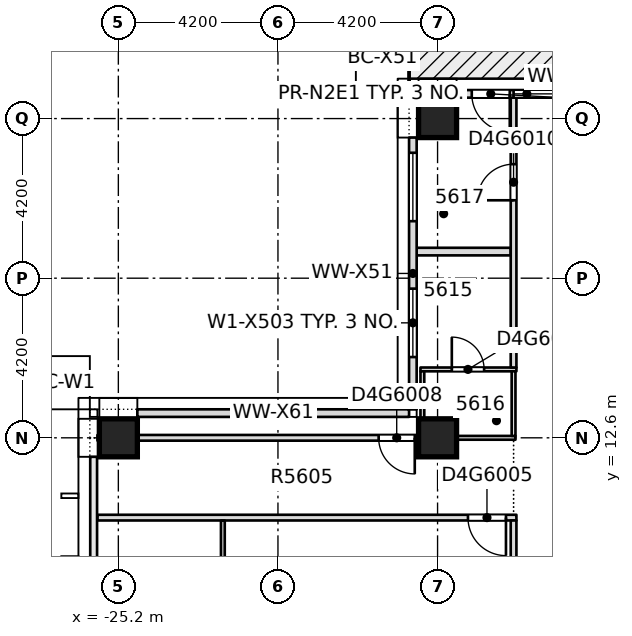
"""IFC4 building model, lengths in metres.
Left out: names, types, materials, properties, quantities, classifications, styles, units other than length and angle.
Written with IfcOpenShell. Run it as: python <this file> out.ifc"""

import sys

from ifc_helpers import new_model, si_unit, direction, frame, frame_2d, origin, origin_2d, place, context, subcontext, project, spatial, rectangle, extrude, element, fill, save


model = new_model("IFC4")
c1 = context("Model", 3, precision=1e-05, world=origin(), true_north=direction((0.0, 1.0)))
c2 = subcontext(c1, "Body", "Model", "MODEL_VIEW")
j1 = project(units=[si_unit("LENGTHUNIT", "METRE"), si_unit("PLANEANGLEUNIT", "RADIAN")], contexts=[c1])
p1 = place(None, origin())
s1 = spatial("IfcSite", under=j1, at=p1, CompositionType="ELEMENT")
p2 = place(p1, origin())
s2 = spatial("IfcBuilding", under=s1, at=p2, CompositionType="ELEMENT")
p3 = place(p2, frame((0.0, 0.0, 213.5)))
s3 = spatial("IfcBuildingStorey", under=s2, at=p3, CompositionType="ELEMENT", Elevation=213.5)
p4 = place(p3, frame((-25.2, 12.6, -0.4), z_axis=(0.0, 0.0, 1.0), x_axis=(1.0, 0.0, 0.0)))
e1 = element("IfcColumn", 1, at=p4, inside=s3, PredefinedType="COLUMN", context=c2, shape_type="SweptSolid", body=[
    extrude(rectangle(XDim=1.0, YDim=1.0, at=origin_2d()), origin(), (0.0, 0.0, 1.0), 3.4),
])
p5 = place(p3, frame((-16.8, 12.6, -0.4), z_axis=(0.0, 0.0, 1.0), x_axis=(1.0, 0.0, 0.0)))
e2 = element("IfcColumn", 2, at=p5, inside=s3, PredefinedType="COLUMN", context=c2, shape_type="SweptSolid", body=[
    extrude(rectangle(XDim=1.0, YDim=1.0, at=origin_2d()), origin(), (0.0, 0.0, 1.0), 3.85),
])
p6 = place(p3, frame((-16.8, 21.0, -0.4), z_axis=(0.0, 0.0, 1.0), x_axis=(1.0, 0.0, 0.0)))
e3 = element("IfcColumn", 3, at=p6, inside=s3, PredefinedType="COLUMN", context=c2, shape_type="SweptSolid", body=[
    extrude(rectangle(XDim=1.0, YDim=1.0, at=origin_2d()), origin(), (0.0, 0.0, 1.0), 3.4),
])
p7 = place(p3, frame((-25.75, 10.5, 0.0), z_axis=(0.0, 0.0, 1.0), x_axis=(1.0, 0.0, 0.0)))
e4 = element("IfcWall", 4, at=p7, inside=s3, PredefinedType="PARTITIONING", context=c2, shape_type="SweptSolid", body=[
    extrude(rectangle(XDim=11.025, YDim=0.15, at=frame_2d((5.512, 0.0))), origin(), (0.0, 0.0, 1.0), 3.0),
])
p8 = place(p7, frame((9.75, 0.0, 0.0)))
e5 = element("IfcOpeningElement", 5, at=p8, cuts=e4, PredefinedType="OPENING", context=c2, shape_type="SweptSolid", body=[
    extrude(rectangle(XDim=1.0, YDim=2.1, at=frame_2d((0.5, 1.05))), frame((0.0, 0.085, 0.0), z_axis=(0.0, -1.0, 0.0), x_axis=(1.0, 0.0, 0.0)), (0.0, 0.0, 1.0), 0.17),
])
p9 = place(p3, frame((-25.75, 12.6, 0.0), z_axis=(0.0, 0.0, 1.0), x_axis=(1.0, 0.0, 0.0)))
e6 = element("IfcWall", 6, at=p9, inside=s3, PredefinedType="PARTITIONING", context=c2, shape_type="SweptSolid", body=[
    extrude(rectangle(XDim=1.05, YDim=0.15, at=frame_2d((0.525, 0.0))), origin(), (0.0, 0.0, 1.0), 3.0),
])
p10 = place(p3, frame((-17.25, 12.6, 0.0), z_axis=(0.0, 0.0, 1.0), x_axis=(1.0, 0.0, 0.0)))
e7 = element("IfcWall", 7, at=p10, inside=s3, PredefinedType="PARTITIONING", context=c2, shape_type="SweptSolid", body=[
    extrude(rectangle(XDim=2.5, YDim=0.1, at=frame_2d((1.25, 0.0))), origin(), (0.0, 0.0, 1.0), 3.0),
])
p11 = place(p3, frame((-17.25, 14.4, 0.0), z_axis=(0.0, 0.0, 1.0), x_axis=(1.0, 0.0, 0.0)))
e8 = element("IfcWall", 8, at=p11, inside=s3, PredefinedType="PARTITIONING", context=c2, shape_type="SweptSolid", body=[
    extrude(rectangle(XDim=2.525, YDim=0.1, at=frame_2d((1.262, 0.0))), origin(), (0.0, 0.0, 1.0), 3.0),
])
p12 = place(p11, frame((0.825, 0.0, 0.0)))
e9 = element("IfcOpeningElement", 9, at=p12, cuts=e8, PredefinedType="OPENING", context=c2, shape_type="SweptSolid", body=[
    extrude(rectangle(XDim=0.85, YDim=2.1, at=frame_2d((0.425, 1.05))), frame((0.0, 0.06, 0.0), z_axis=(0.0, -1.0, 0.0), x_axis=(1.0, 0.0, 0.0)), (0.0, 0.0, 1.0), 0.12),
])
p13 = place(p3, frame((-17.35, 17.5, 0.0), z_axis=(0.0, 0.0, 1.0), x_axis=(1.0, 0.0, 0.0)))
e10 = element("IfcWall", 10, at=p13, inside=s3, PredefinedType="PARTITIONING", context=c2, shape_type="SweptSolid", body=[
    extrude(rectangle(XDim=2.475, YDim=0.2, at=frame_2d((1.238, 0.0))), origin(), (0.0, 0.0, 1.0), 3.0),
])
p14 = place(p3, frame((-22.45, 5.45, 0.0), z_axis=(0.0, 0.0, 1.0), x_axis=(0.0, 1.0, 0.0)))
e11 = element("IfcWall", 11, at=p14, inside=s3, PredefinedType="PARTITIONING", context=c2, shape_type="SweptSolid", body=[
    extrude(rectangle(XDim=4.975, YDim=0.1, at=frame_2d((2.488, 0.0))), origin(), (0.0, 0.0, 1.0), 3.0),
])
p15 = place(p3, frame((-17.2, 12.675, 0.0), z_axis=(0.0, 0.0, 1.0), x_axis=(0.0, 1.0, 0.0)))
e12 = element("IfcWall", 12, at=p15, inside=s3, PredefinedType="PARTITIONING", context=c2, shape_type="SweptSolid", body=[
    extrude(rectangle(XDim=1.675, YDim=0.1, at=frame_2d((0.837, 0.0))), origin(), (0.0, 0.0, 1.0), 3.0),
])
p16 = place(p3, frame((-14.8, -3.35, 0.0), z_axis=(0.0, 0.0, 1.0), x_axis=(0.0, 1.0, 0.0)))
e13 = element("IfcWall", 13, at=p16, inside=s3, PredefinedType="PARTITIONING", context=c2, shape_type="SweptSolid", body=[
    extrude(rectangle(XDim=13.775, YDim=0.15, at=frame_2d((6.888, 0.0))), origin(), (0.0, 0.0, 1.0), 3.0),
])
p17 = place(p16, frame((2.8, 0.0, 0.0)))
e14 = element("IfcOpeningElement", 14, at=p17, cuts=e13, PredefinedType="OPENING", context=c2, shape_type="SweptSolid", body=[
    extrude(rectangle(XDim=1.1, YDim=2.1, at=frame_2d((0.55, 1.05))), frame((0.0, 0.085, 0.0), z_axis=(0.0, -1.0, 0.0), x_axis=(1.0, 0.0, 0.0)), (0.0, 0.0, 1.0), 0.17),
])
p18 = place(p3, frame((-14.8, 12.65, 0.0), z_axis=(0.0, 0.0, 1.0), x_axis=(0.0, 1.0, 0.0)))
e15 = element("IfcWall", 15, at=p18, inside=s3, PredefinedType="PARTITIONING", context=c2, shape_type="SweptSolid", body=[
    extrude(rectangle(XDim=1.7, YDim=0.1, at=frame_2d((0.85, 0.0))), origin(), (0.0, 0.0, 1.0), 3.0),
])
p19 = place(p3, frame((-14.8, 14.45, 0.0), z_axis=(0.0, 0.0, 1.0), x_axis=(0.0, 1.0, 0.0)))
e16 = element("IfcWall", 16, at=p19, inside=s3, PredefinedType="PARTITIONING", context=c2, shape_type="SweptSolid", body=[
    extrude(rectangle(XDim=7.1, YDim=0.15, at=frame_2d((3.55, 0.0))), origin(), (0.0, 0.0, 1.0), 3.0),
])
p20 = place(p19, frame((4.4, 0.0, 0.0)))
e17 = element("IfcOpeningElement", 17, at=p20, cuts=e16, PredefinedType="OPENING", context=c2, shape_type="SweptSolid", body=[
    extrude(rectangle(XDim=0.95, YDim=2.1, at=frame_2d((0.475, 1.05))), frame((0.0, 0.085, 0.0), z_axis=(0.0, -1.0, 0.0), x_axis=(1.0, 0.0, 0.0)), (0.0, 0.0, 1.0), 0.17),
])
p21 = place(p3, frame((-12.6, 21.65, 0.0), z_axis=(0.0, 0.0, 1.0), x_axis=(-1.0, 0.0, 0.0)))
e18 = element("IfcWall", 18, at=p21, inside=s3, PredefinedType="STANDARD", context=c2, shape_type="SweptSolid", body=[
    extrude(rectangle(XDim=3.7, YDim=0.2, at=frame_2d((1.85, 0.0))), origin(), (0.0, 0.0, 1.0), 3.0),
])
p22 = place(p21, frame((0.4, 0.0, 0.2)))
e19 = element("IfcOpeningElement", 19, at=p22, cuts=e18, PredefinedType="OPENING", context=c2, shape_type="SweptSolid", body=[
    extrude(rectangle(XDim=1.8, YDim=2.65, at=frame_2d((0.9, 1.325))), frame((0.0, 0.11, 0.0), z_axis=(0.0, -1.0, 0.0), x_axis=(1.0, 0.0, 0.0)), (0.0, 0.0, 1.0), 0.22),
])
p23 = place(p21, frame((2.3, 0.0, 0.0)))
e20 = element("IfcOpeningElement", 20, at=p23, cuts=e18, PredefinedType="OPENING", context=c2, shape_type="SweptSolid", body=[
    extrude(rectangle(XDim=1.0, YDim=2.4, at=frame_2d((0.5, 1.2))), frame((0.0, 0.11, 0.0), z_axis=(0.0, -1.0, 0.0), x_axis=(1.0, 0.0, 0.0)), (0.0, 0.0, 1.0), 0.22),
])
p24 = place(p3, frame((-17.45, 20.5, 0.0), z_axis=(0.0, 0.0, 1.0), x_axis=(0.0, -1.0, 0.0)))
e21 = element("IfcWall", 21, at=p24, inside=s3, PredefinedType="STANDARD", context=c2, shape_type="SweptSolid", body=[
    extrude(rectangle(XDim=7.15, YDim=0.2, at=frame_2d((3.575, 0.0))), origin(), (0.0, 0.0, 1.0), 3.0),
])
p25 = place(p24, frame((3.975, 0.0, 0.2)))
e22 = element("IfcOpeningElement", 22, at=p25, cuts=e21, PredefinedType="OPENING", context=c2, shape_type="SweptSolid", body=[
    extrude(rectangle(XDim=1.8, YDim=2.65, at=frame_2d((0.9, 1.325))), frame((0.0, 0.11, 0.0), z_axis=(0.0, -1.0, 0.0), x_axis=(1.0, 0.0, 0.0)), (0.0, 0.0, 1.0), 0.22),
])
p26 = place(p24, frame((0.4, 0.0, 0.2)))
e23 = element("IfcOpeningElement", 23, at=p26, cuts=e21, PredefinedType="OPENING", context=c2, shape_type="SweptSolid", body=[
    extrude(rectangle(XDim=1.8, YDim=2.65, at=frame_2d((0.9, 1.325))), frame((0.0, 0.11, 0.0), z_axis=(0.0, -1.0, 0.0), x_axis=(1.0, 0.0, 0.0)), (0.0, 0.0, 1.0), 0.22),
])
p27 = place(p3, frame((-17.55, 13.25, 0.0), z_axis=(0.0, 0.0, 1.0), x_axis=(-1.0, 0.0, 0.0)))
e24 = element("IfcWall", 24, at=p27, inside=s3, PredefinedType="STANDARD", context=c2, shape_type="SweptSolid", body=[
    extrude(rectangle(XDim=7.15, YDim=0.2, at=frame_2d((3.575, 0.0))), origin(), (0.0, 0.0, 1.0), 3.0),
])
p28 = place(p3, frame((-24.7, 12.6, 0.0), z_axis=(0.0, 0.0, 1.0), x_axis=(1.0, 0.0, 0.0)))
e25 = element("IfcWall", 25, at=p28, inside=s3, PredefinedType="PARTITIONING", context=c2, shape_type="SweptSolid", body=[
    extrude(rectangle(XDim=7.4, YDim=0.15, at=frame_2d((3.7, 0.0))), origin(), (0.0, 0.0, 1.0), 2.45),
])
p29 = place(p28, frame((6.35, 0.0, 0.0)))
e26 = element("IfcOpeningElement", 26, at=p29, cuts=e25, PredefinedType="OPENING", context=c2, shape_type="SweptSolid", body=[
    extrude(rectangle(XDim=0.95, YDim=2.1, at=frame_2d((0.475, 1.05))), frame((0.0, 0.085, 0.0), z_axis=(0.0, -1.0, 0.0), x_axis=(1.0, 0.0, 0.0)), (0.0, 0.0, 1.0), 0.17),
])
p30 = place(p3, frame((-17.3, 12.6, 0.0), z_axis=(0.0, 0.0, 1.0), x_axis=(1.0, 0.0, 0.0)))
e27 = element("IfcWall", 27, at=p30, inside=s3, PredefinedType="PARTITIONING", context=c2, shape_type="SweptSolid", body=[
    extrude(rectangle(XDim=0.15, YDim=0.15, at=frame_2d((0.075, 0.0))), origin(), (0.0, 0.0, 1.0), 3.0),
])
p31 = place(p8, origin())
e28 = element("IfcDoor", 28, at=p31, inside=s3, OperationType="SINGLE_SWING_RIGHT", PredefinedType="DOOR", context=c2, shape_type="SweptSolid", body=[
    extrude(rectangle(XDim=1.0, YDim=2.1, at=frame_2d((0.5, 1.05))), frame((0.0, 0.025, 0.0), z_axis=(0.0, -1.0, 0.0), x_axis=(1.0, 0.0, 0.0)), (0.0, 0.0, 1.0), 0.05),
])
fill(e5, e28)
p32 = place(p29, origin())
e29 = element("IfcDoor", 29, at=p32, inside=s3, OperationType="SINGLE_SWING_LEFT", PredefinedType="DOOR", context=c2, shape_type="SweptSolid", body=[
    extrude(rectangle(XDim=0.95, YDim=2.1, at=frame_2d((0.475, 1.05))), frame((0.0, 0.025, 0.0), z_axis=(0.0, -1.0, 0.0), x_axis=(1.0, 0.0, 0.0)), (0.0, 0.0, 1.0), 0.05),
])
fill(e26, e29)
p33 = place(p12, origin())
e30 = element("IfcDoor", 30, at=p33, inside=s3, OperationType="SINGLE_SWING_RIGHT", PredefinedType="DOOR", context=c2, shape_type="SweptSolid", body=[
    extrude(rectangle(XDim=0.85, YDim=2.1, at=frame_2d((0.425, 1.05))), frame((0.0, 0.025, 0.0), z_axis=(0.0, -1.0, 0.0), x_axis=(1.0, 0.0, 0.0)), (0.0, 0.0, 1.0), 0.05),
])
fill(e9, e30)
p34 = place(p20, origin())
e31 = element("IfcDoor", 31, at=p34, inside=s3, OperationType="SINGLE_SWING_LEFT", PredefinedType="DOOR", context=c2, shape_type="SweptSolid", body=[
    extrude(rectangle(XDim=0.95, YDim=2.1, at=frame_2d((0.475, 1.05))), frame((0.0, 0.025, 0.0), z_axis=(0.0, -1.0, 0.0), x_axis=(1.0, 0.0, 0.0)), (0.0, 0.0, 1.0), 0.05),
])
fill(e17, e31)
p35 = place(p22, origin())
e32 = element("IfcWindow", 32, at=p35, inside=s3, PartitioningType="SINGLE_PANEL", PredefinedType="WINDOW", context=c2, shape_type="SweptSolid", body=[
    extrude(rectangle(XDim=1.8, YDim=2.65, at=frame_2d((0.9, 1.325))), frame((0.0, 0.03, 0.0), z_axis=(0.0, -1.0, 0.0), x_axis=(1.0, 0.0, 0.0)), (0.0, 0.0, 1.0), 0.06),
])
fill(e19, e32)
p36 = place(p23, origin())
e33 = element("IfcDoor", 33, at=p36, inside=s3, OperationType="SINGLE_SWING_LEFT", PredefinedType="DOOR", context=c2, shape_type="SweptSolid", body=[
    extrude(rectangle(XDim=1.0, YDim=2.4, at=frame_2d((0.5, 1.2))), frame((0.0, 0.025, 0.0), z_axis=(0.0, -1.0, 0.0), x_axis=(1.0, 0.0, 0.0)), (0.0, 0.0, 1.0), 0.05),
])
fill(e20, e33)
p37 = place(p25, origin())
e34 = element("IfcWindow", 34, at=p37, inside=s3, PartitioningType="SINGLE_PANEL", PredefinedType="WINDOW", context=c2, shape_type="SweptSolid", body=[
    extrude(rectangle(XDim=1.8, YDim=2.65, at=frame_2d((0.9, 1.325))), frame((0.0, 0.03, 0.0), z_axis=(0.0, -1.0, 0.0), x_axis=(1.0, 0.0, 0.0)), (0.0, 0.0, 1.0), 0.06),
])
fill(e22, e34)
p38 = place(p26, origin())
e35 = element("IfcWindow", 35, at=p38, inside=s3, PartitioningType="SINGLE_PANEL", PredefinedType="WINDOW", context=c2, shape_type="SweptSolid", body=[
    extrude(rectangle(XDim=1.8, YDim=2.65, at=frame_2d((0.9, 1.325))), frame((0.0, 0.03, 0.0), z_axis=(0.0, -1.0, 0.0), x_axis=(1.0, 0.0, 0.0)), (0.0, 0.0, 1.0), 0.06),
])
fill(e23, e35)
save(model, sys.argv[1])
